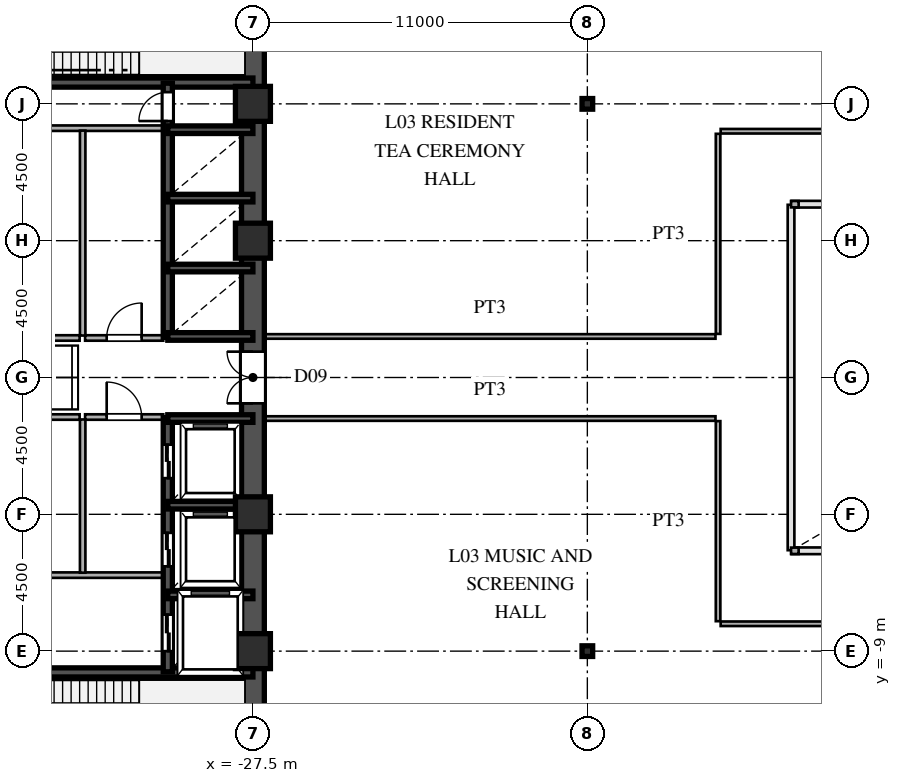
"""IFC4 building model, lengths in metres.
Left out: names, types, materials, properties, quantities, classifications, styles, units other than length and angle.
Written with IfcOpenShell. Run it as: python <this file> out.ifc"""

import sys

from ifc_helpers import new_model, si_unit, direction, frame, frame_2d, origin, origin_2d, place, context, subcontext, project, spatial, rectangle, hollow_rectangle, i_section, extrude, source, transform, mapped, element, fill, save


model = new_model("IFC4")
c1 = context("Model", 3, precision=1e-05, world=origin(), true_north=direction((0.0, 1.0)))
c2 = subcontext(c1, "Body", "Model", "MODEL_VIEW")
j1 = project(units=[si_unit("LENGTHUNIT", "METRE"), si_unit("PLANEANGLEUNIT", "RADIAN")], contexts=[c1])
p1 = place(None, origin())
s1 = spatial("IfcSite", under=j1, at=p1, CompositionType="ELEMENT")
p2 = place(p1, origin())
s2 = spatial("IfcBuilding", under=s1, at=p2, CompositionType="ELEMENT")
p3 = place(p2, frame((0.0, 0.0, 14.4)))
s3 = spatial("IfcBuildingStorey", under=s2, at=p3, CompositionType="ELEMENT", Elevation=14.4)
m1 = source(origin(), c2, "Body", "SweptSolid", [
    extrude(hollow_rectangle(XDim=1.15, YDim=1.15, WallThickness=0.048, at=origin_2d()), origin(), (0.0, 0.0, 1.0), 4.5),
])
for number, where, z_axis, x_axis in (
    (1, (-27.5, -9.0, 0.0), (0.0, 0.0, 1.0), (1.0, 0.0, 0.0)),
    (2, (-27.5, -4.5, 0.0), (0.0, 0.0, 1.0), (1.0, 0.0, 0.0)),
    (3, (-27.5, 4.5, 0.0), (0.0, 0.0, 1.0), (1.0, 0.0, 0.0)),
    (4, (-27.5, 9.0, 0.0), (0.0, 0.0, 1.0), (1.0, 0.0, 0.0)),
):
    element("IfcColumn", number, at=place(p3, frame(where, z_axis=z_axis, x_axis=x_axis)), inside=s3, PredefinedType="COLUMN", context=c2, shape_type="MappedRepresentation", body=[
        mapped(m1, transform((0.0, 0.0, 0.0), scale=1.0)),
    ])
m2 = source(origin(), c2, "Body", "SweptSolid", [
    extrude(i_section(OverallWidth=0.35, OverallDepth=0.35, WebThickness=0.012, FlangeThickness=0.019, at=origin_2d()), origin(), (0.0, 0.0, 1.0), 4.5),
])
for number, where, z_axis, x_axis in (
    (5, (-16.5, -9.0, 0.0), (0.0, 0.0, 1.0), (1.0, 0.0, 0.0)),
    (6, (-16.5, 9.0, 0.0), (0.0, 0.0, 1.0), (1.0, 0.0, 0.0)),
):
    element("IfcColumn", number, at=place(p3, frame(where, z_axis=z_axis, x_axis=x_axis)), inside=s3, PredefinedType="COLUMN", context=c2, shape_type="MappedRepresentation", body=[
        mapped(m2, transform((0.0, 0.0, 0.0), scale=1.0)),
    ])
p4 = place(p3, frame((-72.463, -10.015, 0.0), z_axis=(0.0, 0.0, 1.0), x_axis=(0.926944846568, -0.375197616492, 0.0)))
e7 = element("IfcWall", 7, at=p4, inside=s3, PredefinedType="SOLIDWALL", context=c2, shape_type="SweptSolid", body=[
    extrude(rectangle(XDim=45.23, YDim=0.32, at=frame_2d((22.615, 0.0))), origin(), (0.0, 0.0, 1.0), 4.28),
])
p5 = place(p4, frame((6.0, 0.0, 0.85)))
e8 = element("IfcOpeningElement", 8, at=p5, cuts=e7, PredefinedType="OPENING", context=c2, shape_type="SweptSolid", body=[
    extrude(rectangle(XDim=1.8, YDim=2.0, at=frame_2d((0.9, 1.0))), frame((0.0, 0.17, 0.0), z_axis=(0.0, -1.0, 0.0), x_axis=(1.0, 0.0, 0.0)), (0.0, 0.0, 1.0), 0.34),
])
p6 = place(p4, frame((36.23, 0.0, 0.85)))
e9 = element("IfcOpeningElement", 9, at=p6, cuts=e7, PredefinedType="OPENING", context=c2, shape_type="SweptSolid", body=[
    extrude(rectangle(XDim=1.8, YDim=2.0, at=frame_2d((0.9, 1.0))), frame((0.0, 0.17, 0.0), z_axis=(0.0, -1.0, 0.0), x_axis=(1.0, 0.0, 0.0)), (0.0, 0.0, 1.0), 0.34),
])
p7 = place(p3, frame((-30.537, 26.985, 0.0), z_axis=(0.0, 0.0, 1.0), x_axis=(-0.926944846568, -0.375197616492, 0.0)))
e10 = element("IfcWall", 10, at=p7, inside=s3, PredefinedType="SOLIDWALL", context=c2, shape_type="SweptSolid", body=[
    extrude(rectangle(XDim=45.23, YDim=0.32, at=frame_2d((22.615, 0.0))), origin(), (0.0, 0.0, 1.0), 4.28),
])
p8 = place(p7, frame((6.0, 0.0, 0.85)))
e11 = element("IfcOpeningElement", 11, at=p8, cuts=e10, PredefinedType="OPENING", context=c2, shape_type="SweptSolid", body=[
    extrude(rectangle(XDim=1.8, YDim=2.0, at=frame_2d((0.9, 1.0))), frame((0.0, 0.17, 0.0), z_axis=(0.0, -1.0, 0.0), x_axis=(1.0, 0.0, 0.0)), (0.0, 0.0, 1.0), 0.34),
])
p9 = place(p7, frame((36.23, 0.0, 0.85)))
e12 = element("IfcOpeningElement", 12, at=p9, cuts=e10, PredefinedType="OPENING", context=c2, shape_type="SweptSolid", body=[
    extrude(rectangle(XDim=1.8, YDim=2.0, at=frame_2d((0.9, 1.0))), frame((0.0, 0.17, 0.0), z_axis=(0.0, -1.0, 0.0), x_axis=(1.0, 0.0, 0.0)), (0.0, 0.0, 1.0), 0.34),
])
for number, where, z_axis, x_axis in (
    (13, (-9.8, -5.7, 0.0), (0.0, 0.0, 1.0), (1.0, 0.0, 0.0)),
    (14, (-9.8, 5.7, 0.0), (0.0, 0.0, 1.0), (1.0, 0.0, 0.0)),
):
    element("IfcWall", number, at=place(p3, frame(where, z_axis=z_axis, x_axis=x_axis)), inside=s3, PredefinedType="SOLIDWALL", context=c2, shape_type="SweptSolid", body=[
        extrude(rectangle(XDim=0.25, YDim=0.21, at=frame_2d((0.125, 0.0))), origin(), (0.0, 0.0, 1.0), 4.28),
    ])
for number, where, z_axis, x_axis in (
    (15, (-27.5, -13.5, 0.0), (0.0, 0.0, 1.0), (0.0, 1.0, 0.0)),
    (16, (-27.5, 1.3, 0.0), (0.0, 0.0, 1.0), (0.0, 1.0, 0.0)),
):
    element("IfcWall", number, at=place(p3, frame(where, z_axis=z_axis, x_axis=x_axis)), inside=s3, PredefinedType="SHEAR", context=c2, shape_type="SweptSolid", body=[
        extrude(rectangle(XDim=12.2, YDim=0.75, at=frame_2d((6.1, 0.0))), origin(), (0.0, 0.0, 1.0), 4.28),
    ])
p10 = place(p3, frame((-27.5, -1.3, 0.0), z_axis=(0.0, 0.0, 1.0), x_axis=(0.0, 1.0, 0.0)))
e17 = element("IfcWall", 17, at=p10, inside=s3, PredefinedType="SHEAR", context=c2, shape_type="SweptSolid", body=[
    extrude(rectangle(XDim=2.6, YDim=0.75, at=frame_2d((1.3, 0.0))), origin(), (0.0, 0.0, 1.0), 4.28),
])
p11 = place(p10, frame((0.45, 0.0, 0.0)))
e18 = element("IfcOpeningElement", 18, at=p11, cuts=e17, PredefinedType="OPENING", context=c2, shape_type="SweptSolid", body=[
    extrude(rectangle(XDim=1.7, YDim=2.35, at=frame_2d((0.85, 1.175))), frame((0.0, 0.385, 0.0), z_axis=(0.0, -1.0, 0.0), x_axis=(1.0, 0.0, 0.0)), (0.0, 0.0, 1.0), 0.77),
])
p12 = place(p3, frame((-36.5, -9.7, 0.0), z_axis=(0.0, 0.0, 1.0), x_axis=(1.0, 0.0, 0.0)))
e19 = element("IfcWall", 19, at=p12, inside=s3, PredefinedType="SHEAR", context=c2, shape_type="SweptSolid", body=[
    extrude(rectangle(XDim=9.0, YDim=0.3, at=frame_2d((4.5, 0.0))), origin(), (0.0, 0.0, 1.0), 4.28),
])
p13 = place(p12, frame((0.6, 0.0, 0.0)))
e20 = element("IfcOpeningElement", 20, at=p13, cuts=e19, PredefinedType="OPENING", context=c2, shape_type="SweptSolid", body=[
    extrude(rectangle(XDim=1.1, YDim=2.2, at=frame_2d((0.55, 1.1))), frame((0.0, 0.16, 0.0), z_axis=(0.0, -1.0, 0.0), x_axis=(1.0, 0.0, 0.0)), (0.0, 0.0, 1.0), 0.32),
])
p14 = place(p3, frame((-36.5, 9.7, 0.0), z_axis=(0.0, 0.0, 1.0), x_axis=(1.0, 0.0, 0.0)))
e21 = element("IfcWall", 21, at=p14, inside=s3, PredefinedType="SHEAR", context=c2, shape_type="SweptSolid", body=[
    extrude(rectangle(XDim=9.0, YDim=0.3, at=frame_2d((4.5, 0.0))), origin(), (0.0, 0.0, 1.0), 4.28),
])
p15 = place(p14, frame((0.6, 0.0, 0.0)))
e22 = element("IfcOpeningElement", 22, at=p15, cuts=e21, PredefinedType="OPENING", context=c2, shape_type="SweptSolid", body=[
    extrude(rectangle(XDim=1.1, YDim=2.2, at=frame_2d((0.55, 1.1))), frame((0.0, 0.16, 0.0), z_axis=(0.0, -1.0, 0.0), x_axis=(1.0, 0.0, 0.0)), (0.0, 0.0, 1.0), 0.32),
])
for number, where, z_axis, x_axis in (
    (23, (-30.3, -7.15, 0.0), (0.0, 0.0, 1.0), (1.0, 0.0, 0.0)),
    (24, (-30.3, -4.2, 0.0), (0.0, 0.0, 1.0), (1.0, 0.0, 0.0)),
    (25, (-30.3, -1.35, 0.0), (0.0, 0.0, 1.0), (1.0, 0.0, 0.0)),
    (26, (-30.3, 1.35, 0.0), (0.0, 0.0, 1.0), (1.0, 0.0, 0.0)),
    (27, (-30.3, 3.6, 0.0), (0.0, 0.0, 1.0), (1.0, 0.0, 0.0)),
    (28, (-30.3, 5.9, 0.0), (0.0, 0.0, 1.0), (1.0, 0.0, 0.0)),
    (29, (-30.3, 8.15, 0.0), (0.0, 0.0, 1.0), (1.0, 0.0, 0.0)),
):
    element("IfcWall", number, at=place(p3, frame(where, z_axis=z_axis, x_axis=x_axis)), inside=s3, PredefinedType="SHEAR", context=c2, shape_type="SweptSolid", body=[
        extrude(rectangle(XDim=2.8, YDim=0.25, at=frame_2d((1.4, 0.0))), origin(), (0.0, 0.0, 1.0), 4.28),
    ])
p16 = place(p3, frame((-30.3, -9.68, 0.0), z_axis=(0.0, 0.0, 1.0), x_axis=(0.0, 1.0, 0.0)))
e30 = element("IfcWall", 30, at=p16, inside=s3, PredefinedType="SHEAR", context=c2, shape_type="SweptSolid", body=[
    extrude(rectangle(XDim=2.56, YDim=0.3, at=frame_2d((1.28, 0.0))), origin(), (0.0, 0.0, 1.0), 4.28),
])
p17 = place(p16, frame((0.68, 0.0, 0.0)))
e31 = element("IfcOpeningElement", 31, at=p17, cuts=e30, PredefinedType="OPENING", context=c2, shape_type="SweptSolid", body=[
    extrude(rectangle(XDim=1.2, YDim=2.25, at=frame_2d((0.6, 1.125))), frame((0.0, 0.16, 0.0), z_axis=(0.0, -1.0, 0.0), x_axis=(1.0, 0.0, 0.0)), (0.0, 0.0, 1.0), 0.32),
])
p18 = place(p3, frame((-30.3, -7.12, 0.0), z_axis=(0.0, 0.0, 1.0), x_axis=(0.0, 1.0, 0.0)))
e32 = element("IfcWall", 32, at=p18, inside=s3, PredefinedType="SHEAR", context=c2, shape_type="SweptSolid", body=[
    extrude(rectangle(XDim=2.92, YDim=0.3, at=frame_2d((1.46, 0.0))), origin(), (0.0, 0.0, 1.0), 4.28),
])
p19 = place(p18, frame((0.91, 0.0, 0.0)))
e33 = element("IfcOpeningElement", 33, at=p19, cuts=e32, PredefinedType="OPENING", context=c2, shape_type="SweptSolid", body=[
    extrude(rectangle(XDim=1.1, YDim=2.2, at=frame_2d((0.55, 1.1))), frame((0.0, 0.16, 0.0), z_axis=(0.0, -1.0, 0.0), x_axis=(1.0, 0.0, 0.0)), (0.0, 0.0, 1.0), 0.32),
])
p20 = place(p3, frame((-30.3, -4.2, 0.0), z_axis=(0.0, 0.0, 1.0), x_axis=(0.0, 1.0, 0.0)))
e34 = element("IfcWall", 34, at=p20, inside=s3, PredefinedType="SHEAR", context=c2, shape_type="SweptSolid", body=[
    extrude(rectangle(XDim=2.88, YDim=0.3, at=frame_2d((1.44, 0.0))), origin(), (0.0, 0.0, 1.0), 4.28),
])
p21 = place(p20, frame((0.89, 0.0, 0.0)))
e35 = element("IfcOpeningElement", 35, at=p21, cuts=e34, PredefinedType="OPENING", context=c2, shape_type="SweptSolid", body=[
    extrude(rectangle(XDim=1.1, YDim=2.2, at=frame_2d((0.55, 1.1))), frame((0.0, 0.16, 0.0), z_axis=(0.0, -1.0, 0.0), x_axis=(1.0, 0.0, 0.0)), (0.0, 0.0, 1.0), 0.32),
])
p22 = place(p3, frame((-30.3, 1.32, 0.0), z_axis=(0.0, 0.0, 1.0), x_axis=(0.0, 1.0, 0.0)))
e36 = element("IfcWall", 36, at=p22, inside=s3, PredefinedType="SHEAR", context=c2, shape_type="SweptSolid", body=[
    extrude(rectangle(XDim=2.28, YDim=0.3, at=frame_2d((1.14, 0.0))), origin(), (0.0, 0.0, 1.0), 4.28),
])
p23 = place(p3, frame((-30.3, 3.6, 0.0), z_axis=(0.0, 0.0, 1.0), x_axis=(0.0, 1.0, 0.0)))
e37 = element("IfcWall", 37, at=p23, inside=s3, PredefinedType="SHEAR", context=c2, shape_type="SweptSolid", body=[
    extrude(rectangle(XDim=2.3, YDim=0.3, at=frame_2d((1.15, 0.0))), origin(), (0.0, 0.0, 1.0), 4.28),
])
p24 = place(p3, frame((-30.3, 5.9, 0.0), z_axis=(0.0, 0.0, 1.0), x_axis=(0.0, 1.0, 0.0)))
e38 = element("IfcWall", 38, at=p24, inside=s3, PredefinedType="SHEAR", context=c2, shape_type="SweptSolid", body=[
    extrude(rectangle(XDim=2.25, YDim=0.3, at=frame_2d((1.125, 0.0))), origin(), (0.0, 0.0, 1.0), 4.28),
])
p25 = place(p3, frame((-30.3, 8.15, 0.0), z_axis=(0.0, 0.0, 1.0), x_axis=(0.0, 1.0, 0.0)))
e39 = element("IfcWall", 39, at=p25, inside=s3, PredefinedType="SHEAR", context=c2, shape_type="SweptSolid", body=[
    extrude(rectangle(XDim=1.53, YDim=0.3, at=frame_2d((0.765, 0.0))), origin(), (0.0, 0.0, 1.0), 4.28),
])
p26 = place(p25, frame((0.285, 0.0, 0.0)))
e40 = element("IfcOpeningElement", 40, at=p26, cuts=e39, PredefinedType="OPENING", context=c2, shape_type="SweptSolid", body=[
    extrude(rectangle(XDim=0.95, YDim=2.15, at=frame_2d((0.475, 1.075))), frame((0.0, 0.16, 0.0), z_axis=(0.0, -1.0, 0.0), x_axis=(1.0, 0.0, 0.0)), (0.0, 0.0, 1.0), 0.32),
])
for number, where, z_axis, x_axis in (
    (41, (-36.15, -6.5, 0.0), (0.0, 0.0, 1.0), (1.0, 0.0, 0.0)),
    (42, (-36.15, 8.2, 0.0), (0.0, 0.0, 1.0), (1.0, 0.0, 0.0)),
):
    element("IfcWall", number, at=place(p3, frame(where, z_axis=z_axis, x_axis=x_axis)), inside=s3, PredefinedType="PARTITIONING", context=c2, shape_type="SweptSolid", body=[
        extrude(rectangle(XDim=5.7, YDim=0.18, at=frame_2d((2.85, 0.0))), origin(), (0.0, 0.0, 1.0), 4.28),
    ])
p27 = place(p3, frame((-33.1, -6.42, 0.0), z_axis=(0.0, 0.0, 1.0), x_axis=(0.0, 1.0, 0.0)))
e43 = element("IfcWall", 43, at=p27, inside=s3, PredefinedType="PARTITIONING", context=c2, shape_type="SweptSolid", body=[
    extrude(rectangle(XDim=5.04, YDim=0.18, at=frame_2d((2.52, 0.0))), origin(), (0.0, 0.0, 1.0), 4.28),
])
p28 = place(p3, frame((-33.1, 1.38, 0.0), z_axis=(0.0, 0.0, 1.0), x_axis=(0.0, 1.0, 0.0)))
e44 = element("IfcWall", 44, at=p28, inside=s3, PredefinedType="PARTITIONING", context=c2, shape_type="SweptSolid", body=[
    extrude(rectangle(XDim=6.74, YDim=0.18, at=frame_2d((3.37, 0.0))), origin(), (0.0, 0.0, 1.0), 4.28),
])
p29 = place(p3, frame((-33.02, -1.3, 0.0), z_axis=(0.0, 0.0, 1.0), x_axis=(1.0, 0.0, 0.0)))
e45 = element("IfcWall", 45, at=p29, inside=s3, PredefinedType="PARTITIONING", context=c2, shape_type="SweptSolid", body=[
    extrude(rectangle(XDim=2.57, YDim=0.18, at=frame_2d((1.285, 0.0))), origin(), (0.0, 0.0, 1.0), 4.28),
])
p30 = place(p29, frame((0.71, 0.0, 0.0)))
e46 = element("IfcOpeningElement", 46, at=p30, cuts=e45, PredefinedType="OPENING", context=c2, shape_type="SweptSolid", body=[
    extrude(rectangle(XDim=1.15, YDim=2.2, at=frame_2d((0.575, 1.1))), frame((0.0, 0.1, 0.0), z_axis=(0.0, -1.0, 0.0), x_axis=(1.0, 0.0, 0.0)), (0.0, 0.0, 1.0), 0.2),
])
p31 = place(p3, frame((-33.02, 1.3, 0.0), z_axis=(0.0, 0.0, 1.0), x_axis=(1.0, 0.0, 0.0)))
e47 = element("IfcWall", 47, at=p31, inside=s3, PredefinedType="PARTITIONING", context=c2, shape_type="SweptSolid", body=[
    extrude(rectangle(XDim=2.57, YDim=0.18, at=frame_2d((1.285, 0.0))), origin(), (0.0, 0.0, 1.0), 4.28),
])
p32 = place(p31, frame((0.71, 0.0, 0.0)))
e48 = element("IfcOpeningElement", 48, at=p32, cuts=e47, PredefinedType="OPENING", context=c2, shape_type="SweptSolid", body=[
    extrude(rectangle(XDim=1.15, YDim=2.2, at=frame_2d((0.575, 1.1))), frame((0.0, 0.1, 0.0), z_axis=(0.0, -1.0, 0.0), x_axis=(1.0, 0.0, 0.0)), (0.0, 0.0, 1.0), 0.2),
])
for number, where, z_axis, x_axis in (
    (49, (-36.15, -1.3, 0.0), (0.0, 0.0, 1.0), (1.0, 0.0, 0.0)),
    (50, (-36.15, 1.3, 0.0), (0.0, 0.0, 1.0), (1.0, 0.0, 0.0)),
):
    element("IfcWall", number, at=place(p3, frame(where, z_axis=z_axis, x_axis=x_axis)), inside=s3, PredefinedType="PARTITIONING", context=c2, shape_type="SweptSolid", body=[
        extrude(rectangle(XDim=2.95, YDim=0.18, at=frame_2d((1.475, 0.0))), origin(), (0.0, 0.0, 1.0), 4.28),
    ])
p33 = place(p3, frame((-12.115, -8.1, 0.0), z_axis=(0.0, 0.0, 1.0), x_axis=(1.0, 0.0, 0.0)))
e51 = element("IfcWall", 51, at=p33, inside=s3, PredefinedType="PARTITIONING", context=c2, shape_type="SweptSolid", body=[
    extrude(rectangle(XDim=24.23, YDim=0.15, at=frame_2d((12.115, 0.0))), origin(), (0.0, 0.0, 1.0), 4.28),
])
p34 = place(p33, frame((11.64, 0.0, 0.0)))
e52 = element("IfcOpeningElement", 52, at=p34, cuts=e51, PredefinedType="OPENING", context=c2, shape_type="SweptSolid", body=[
    extrude(rectangle(XDim=0.95, YDim=2.15, at=frame_2d((0.475, 1.075))), frame((0.0, 0.085, 0.0), z_axis=(0.0, -1.0, 0.0), x_axis=(1.0, 0.0, 0.0)), (0.0, 0.0, 1.0), 0.17),
])
for number, where, z_axis, x_axis in (
    (53, (-27.12, -1.35, 0.0), (0.0, 0.0, 1.0), (1.0, 0.0, 0.0)),
    (54, (-27.12, 1.35, 0.0), (0.0, 0.0, 1.0), (1.0, 0.0, 0.0)),
):
    element("IfcWall", number, at=place(p3, frame(where, z_axis=z_axis, x_axis=x_axis)), inside=s3, PredefinedType="PARTITIONING", context=c2, shape_type="SweptSolid", body=[
        extrude(rectangle(XDim=14.835, YDim=0.15, at=frame_2d((7.417, 0.0))), origin(), (0.0, 0.0, 1.0), 4.28),
    ])
p35 = place(p3, frame((-12.115, 8.1, 0.0), z_axis=(0.0, 0.0, 1.0), x_axis=(1.0, 0.0, 0.0)))
e55 = element("IfcWall", 55, at=p35, inside=s3, PredefinedType="PARTITIONING", context=c2, shape_type="SweptSolid", body=[
    extrude(rectangle(XDim=24.23, YDim=0.15, at=frame_2d((12.115, 0.0))), origin(), (0.0, 0.0, 1.0), 4.28),
])
p36 = place(p35, frame((11.64, 0.0, 0.0)))
e56 = element("IfcOpeningElement", 56, at=p36, cuts=e55, PredefinedType="OPENING", context=c2, shape_type="SweptSolid", body=[
    extrude(rectangle(XDim=0.95, YDim=2.15, at=frame_2d((0.475, 1.075))), frame((0.0, 0.085, 0.0), z_axis=(0.0, -1.0, 0.0), x_axis=(1.0, 0.0, 0.0)), (0.0, 0.0, 1.0), 0.17),
])
for number, where, z_axis, x_axis in (
    (57, (-12.2, -8.015, 0.0), (0.0, 0.0, 1.0), (0.0, 1.0, 0.0)),
    (58, (-12.2, 1.435, 0.0), (0.0, 0.0, 1.0), (0.0, 1.0, 0.0)),
):
    element("IfcWall", number, at=place(p3, frame(where, z_axis=z_axis, x_axis=x_axis)), inside=s3, PredefinedType="PARTITIONING", context=c2, shape_type="SweptSolid", body=[
        extrude(rectangle(XDim=6.58, YDim=0.15, at=frame_2d((3.29, 0.0))), origin(), (0.0, 0.0, 1.0), 4.28),
    ])
m3 = source(origin(), c2, "Body", "SweptSolid", [
    extrude(rectangle(XDim=1.7, YDim=2.35, at=frame_2d((0.85, 1.175))), frame((0.0, 0.025, 0.0), z_axis=(0.0, -1.0, 0.0), x_axis=(1.0, 0.0, 0.0)), (0.0, 0.0, 1.0), 0.05),
])
p37 = place(p11, origin())
e59 = element("IfcDoor", 59, at=p37, inside=s3, OperationType="DOUBLE_SWING_LEFT", PredefinedType="DOOR", context=c2, shape_type="MappedRepresentation", body=[
    mapped(m3, transform((0.0, 0.0, 0.0), scale=1.0)),
])
fill(e18, e59)
m4 = source(origin(), c2, "Body", "SweptSolid", [
    extrude(rectangle(XDim=1.2, YDim=2.25, at=frame_2d((0.6, 1.125))), frame((0.0, 0.025, 0.0), z_axis=(0.0, -1.0, 0.0), x_axis=(1.0, 0.0, 0.0)), (0.0, 0.0, 1.0), 0.05),
])
p38 = place(p17, origin())
e60 = element("IfcDoor", 60, at=p38, inside=s3, OperationType="DOUBLE_DOOR_SLIDING", PredefinedType="DOOR", context=c2, shape_type="MappedRepresentation", body=[
    mapped(m4, transform((0.0, 0.0, 0.0), scale=1.0)),
])
fill(e31, e60)
m5 = source(origin(), c2, "Body", "SweptSolid", [
    extrude(rectangle(XDim=1.1, YDim=2.2, at=frame_2d((0.55, 1.1))), frame((0.0, 0.025, 0.0), z_axis=(0.0, -1.0, 0.0), x_axis=(1.0, 0.0, 0.0)), (0.0, 0.0, 1.0), 0.05),
])
p39 = place(p19, origin())
e61 = element("IfcDoor", 61, at=p39, inside=s3, OperationType="DOUBLE_DOOR_SLIDING", PredefinedType="DOOR", context=c2, shape_type="MappedRepresentation", body=[
    mapped(m5, transform((0.0, 0.0, 0.0), scale=1.0)),
])
fill(e33, e61)
p40 = place(p21, origin())
e62 = element("IfcDoor", 62, at=p40, inside=s3, OperationType="DOUBLE_DOOR_SLIDING", PredefinedType="DOOR", context=c2, shape_type="MappedRepresentation", body=[
    mapped(m5, transform((0.0, 0.0, 0.0), scale=1.0)),
])
fill(e35, e62)
m6 = source(origin(), c2, "Body", "SweptSolid", [
    extrude(rectangle(XDim=0.95, YDim=2.15, at=frame_2d((0.475, 1.075))), frame((0.0, 0.025, 0.0), z_axis=(0.0, -1.0, 0.0), x_axis=(1.0, 0.0, 0.0)), (0.0, 0.0, 1.0), 0.05),
])
p41 = place(p26, origin())
e63 = element("IfcDoor", 63, at=p41, inside=s3, OperationType="SINGLE_SWING_LEFT", PredefinedType="DOOR", context=c2, shape_type="MappedRepresentation", body=[
    mapped(m6, transform((0.0, 0.0, 0.0), scale=1.0)),
])
fill(e40, e63)
m7 = source(origin(), c2, "Body", "SweptSolid", [
    extrude(rectangle(XDim=1.15, YDim=2.2, at=frame_2d((0.575, 1.1))), frame((0.0, 0.025, 0.0), z_axis=(0.0, -1.0, 0.0), x_axis=(1.0, 0.0, 0.0)), (0.0, 0.0, 1.0), 0.05),
])
p42 = place(p30, origin())
e64 = element("IfcDoor", 64, at=p42, inside=s3, OperationType="SINGLE_SWING_LEFT", PredefinedType="DOOR", context=c2, shape_type="MappedRepresentation", body=[
    mapped(m7, transform((0.0, 0.0, 0.0), scale=1.0)),
])
fill(e46, e64)
p43 = place(p32, origin())
e65 = element("IfcDoor", 65, at=p43, inside=s3, OperationType="SINGLE_SWING_RIGHT", PredefinedType="DOOR", context=c2, shape_type="MappedRepresentation", body=[
    mapped(m7, transform((0.0, 0.0, 0.0), scale=1.0)),
])
fill(e48, e65)
save(model, sys.argv[1])
